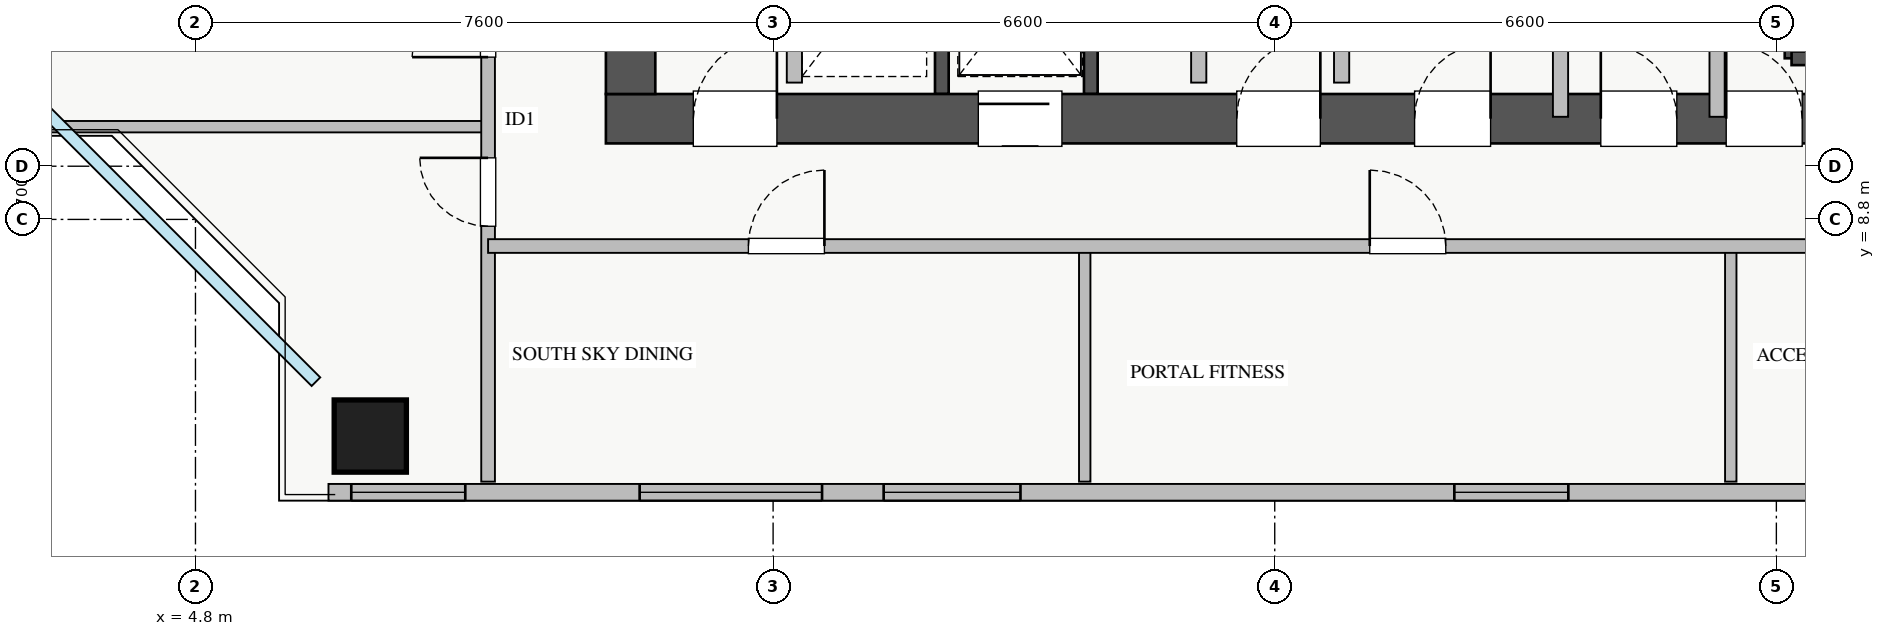
"""IFC4 building model, lengths in metres.
Left out: names, types, materials, properties, quantities, classifications, styles, units other than length and angle.
Written with IfcOpenShell. Run it as: python <this file> out.ifc"""

import sys

from ifc_helpers import new_model, si_unit, direction, frame, frame_2d, origin, origin_2d, place, context, subcontext, project, spatial, rectangle, extrude, source, transform, mapped, element, fill, save


model = new_model("IFC4")
c1 = context("Model", 3, precision=1e-05, world=origin(), true_north=direction((0.0, 1.0)))
c2 = subcontext(c1, "Body", "Model", "MODEL_VIEW")
j1 = project(units=[si_unit("LENGTHUNIT", "METRE"), si_unit("PLANEANGLEUNIT", "RADIAN")], contexts=[c1])
p1 = place(None, origin())
s1 = spatial("IfcSite", under=j1, at=p1, CompositionType="ELEMENT")
p2 = place(p1, origin())
s2 = spatial("IfcBuilding", under=s1, at=p2, CompositionType="ELEMENT")
p3 = place(p2, frame((0.0, 0.0, 160.0)))
s3 = spatial("IfcBuildingStorey", under=s2, at=p3, CompositionType="ELEMENT", Elevation=160.0)
p4 = place(p3, frame((14.62, 10.45, 0.0), z_axis=(0.0, 0.0, 1.0), x_axis=(0.0, 1.0, 0.0)))
e1 = element("IfcWall", 1, at=p4, inside=s3, PredefinedType="SHEAR", context=c2, shape_type="SweptSolid", body=[
    extrude(rectangle(XDim=2.35, YDim=0.18, at=frame_2d((1.175, 0.0))), origin(), (0.0, 0.0, 1.0), 3.07),
])
p5 = place(p3, frame((25.8, 10.92, 0.0), z_axis=(0.0, 0.0, 1.0), x_axis=(0.0, 1.0, 0.0)))
e2 = element("IfcWall", 2, at=p5, inside=s3, PredefinedType="SHEAR", context=c2, shape_type="SweptSolid", body=[
    extrude(rectangle(XDim=1.06, YDim=0.18, at=frame_2d((0.53, 0.0))), origin(), (0.0, 0.0, 1.0), 3.07),
])
p6 = place(p3, frame((25.8, 10.92, 0.0), z_axis=(0.0, 0.0, 1.0), x_axis=(1.0, 0.0, 0.0)))
e3 = element("IfcWall", 3, at=p6, inside=s3, PredefinedType="SHEAR", context=c2, shape_type="SweptSolid", body=[
    extrude(rectangle(XDim=1.35, YDim=0.18, at=frame_2d((0.675, 0.0))), origin(), (0.0, 0.0, 1.0), 3.07),
])
p7 = place(p3, frame((16.58, 10.45, 0.0), z_axis=(0.0, 0.0, 1.0), x_axis=(0.0, 1.0, 0.0)))
e4 = element("IfcWall", 4, at=p7, inside=s3, PredefinedType="SHEAR", context=c2, shape_type="SweptSolid", body=[
    extrude(rectangle(XDim=2.35, YDim=0.18, at=frame_2d((1.175, 0.0))), origin(), (0.0, 0.0, 1.0), 3.07),
])
p8 = place(p3, frame((10.2, 10.125, 0.0), z_axis=(0.0, 0.0, 1.0), x_axis=(1.0, 0.0, 0.0)))
e5 = element("IfcWall", 5, at=p8, inside=s3, PredefinedType="SHEAR", context=c2, shape_type="SweptSolid", body=[
    extrude(rectangle(XDim=17.6, YDim=0.65, at=frame_2d((8.8, 0.0))), origin(), (0.0, 0.0, 1.0), 3.25),
])
p9 = place(p8, frame((1.15, 0.0, 0.0)))
e6 = element("IfcOpeningElement", 6, at=p9, cuts=e5, PredefinedType="OPENING", context=c2, shape_type="SweptSolid", body=[
    extrude(rectangle(XDim=1.1, YDim=2.05, at=frame_2d((0.55, 1.025))), frame((0.0, 0.335, 0.0), z_axis=(0.0, -1.0, 0.0), x_axis=(1.0, 0.0, 0.0)), (0.0, 0.0, 1.0), 0.67),
])
p10 = place(p8, frame((8.3, 0.0, 0.0)))
e7 = element("IfcOpeningElement", 7, at=p10, cuts=e5, PredefinedType="OPENING", context=c2, shape_type="SweptSolid", body=[
    extrude(rectangle(XDim=1.1, YDim=2.05, at=frame_2d((0.55, 1.025))), frame((0.0, 0.335, 0.0), z_axis=(0.0, -1.0, 0.0), x_axis=(1.0, 0.0, 0.0)), (0.0, 0.0, 1.0), 0.67),
])
p11 = place(p8, frame((4.9, 0.0, 0.0)))
e8 = element("IfcOpeningElement", 8, at=p11, cuts=e5, PredefinedType="OPENING", context=c2, shape_type="SweptSolid", body=[
    extrude(rectangle(XDim=1.1, YDim=2.05, at=frame_2d((0.55, 1.025))), frame((0.0, 0.335, 0.0), z_axis=(0.0, -1.0, 0.0), x_axis=(1.0, 0.0, 0.0)), (0.0, 0.0, 1.0), 0.67),
])
p12 = place(p8, frame((14.74, 0.0, 0.0)))
e9 = element("IfcOpeningElement", 9, at=p12, cuts=e5, PredefinedType="OPENING", context=c2, shape_type="SweptSolid", body=[
    extrude(rectangle(XDim=1.0, YDim=2.05, at=frame_2d((0.5, 1.025))), frame((0.0, 0.335, 0.0), z_axis=(0.0, -1.0, 0.0), x_axis=(1.0, 0.0, 0.0)), (0.0, 0.0, 1.0), 0.67),
])
p13 = place(p8, frame((10.64, 0.0, 0.0)))
e10 = element("IfcOpeningElement", 10, at=p13, cuts=e5, PredefinedType="OPENING", context=c2, shape_type="SweptSolid", body=[
    extrude(rectangle(XDim=1.0, YDim=2.05, at=frame_2d((0.5, 1.025))), frame((0.0, 0.335, 0.0), z_axis=(0.0, -1.0, 0.0), x_axis=(1.0, 0.0, 0.0)), (0.0, 0.0, 1.0), 0.67),
])
p14 = place(p8, frame((13.09, 0.0, 0.0)))
e11 = element("IfcOpeningElement", 11, at=p14, cuts=e5, PredefinedType="OPENING", context=c2, shape_type="SweptSolid", body=[
    extrude(rectangle(XDim=1.0, YDim=2.05, at=frame_2d((0.5, 1.025))), frame((0.0, 0.335, 0.0), z_axis=(0.0, -1.0, 0.0), x_axis=(1.0, 0.0, 0.0)), (0.0, 0.0, 1.0), 0.67),
])
p15 = place(p3, frame((10.525, 10.45, 0.0), z_axis=(0.0, 0.0, 1.0), x_axis=(0.0, 1.0, 0.0)))
e12 = element("IfcWall", 12, at=p15, inside=s3, PredefinedType="SHEAR", context=c2, shape_type="SweptSolid", body=[
    extrude(rectangle(XDim=5.9, YDim=0.65, at=frame_2d((2.95, 0.0))), origin(), (0.0, 0.0, 1.0), 3.25),
])
m1 = source(origin(), c2, "Body", "SweptSolid", [
    extrude(rectangle(XDim=0.95, YDim=0.95, at=origin_2d()), origin(), (0.0, 0.0, 1.0), 3.25),
])
p16 = place(p3, frame((7.1, 5.95, 0.0), z_axis=(0.0, 0.0, 1.0), x_axis=(1.0, 0.0, 0.0)))
e13 = element("IfcColumn", 13, at=p16, inside=s3, PredefinedType="COLUMN", context=c2, shape_type="MappedRepresentation", body=[
    mapped(m1, transform((0.0, 0.0, 0.0), x_axis=(1.0, 0.0, 0.0), y_axis=(0.0, 1.0, 0.0), z_axis=(0.0, 0.0, 1.0), scale=1.0)),
])
p17 = place(p3, frame((6.55, 5.21, 0.0), z_axis=(0.0, 0.0, 1.0), x_axis=(1.0, 0.0, 0.0)))
e14 = element("IfcWall", 14, at=p17, inside=s3, PredefinedType="STANDARD", context=c2, shape_type="SweptSolid", body=[
    extrude(rectangle(XDim=24.9, YDim=0.22, at=frame_2d((12.45, 0.0))), origin(), (0.0, 0.0, 1.0), 2.61),
])
p18 = place(p17, frame((0.3, 0.0, 0.9)))
e15 = element("IfcOpeningElement", 15, at=p18, cuts=e14, PredefinedType="OPENING", context=c2, shape_type="SweptSolid", body=[
    extrude(rectangle(XDim=1.5, YDim=1.5, at=frame_2d((0.75, 0.75))), frame((0.0, 0.12, 0.0), z_axis=(0.0, -1.0, 0.0), x_axis=(1.0, 0.0, 0.0)), (0.0, 0.0, 1.0), 0.24),
])
p19 = place(p17, frame((7.304, 0.0, 0.9)))
e16 = element("IfcOpeningElement", 16, at=p19, cuts=e14, PredefinedType="OPENING", context=c2, shape_type="SweptSolid", body=[
    extrude(rectangle(XDim=1.8, YDim=1.5, at=frame_2d((0.9, 0.75))), frame((0.0, 0.12, 0.0), z_axis=(0.0, -1.0, 0.0), x_axis=(1.0, 0.0, 0.0)), (0.0, 0.0, 1.0), 0.24),
])
p20 = place(p17, frame((14.813, 0.0, 0.9)))
e17 = element("IfcOpeningElement", 17, at=p20, cuts=e14, PredefinedType="OPENING", context=c2, shape_type="SweptSolid", body=[
    extrude(rectangle(XDim=1.5, YDim=1.45, at=frame_2d((0.75, 0.725))), frame((0.0, 0.12, 0.0), z_axis=(0.0, -1.0, 0.0), x_axis=(1.0, 0.0, 0.0)), (0.0, 0.0, 1.0), 0.24),
])
p21 = place(p17, frame((20.738, 0.0, 0.9)))
e18 = element("IfcOpeningElement", 18, at=p21, cuts=e14, PredefinedType="OPENING", context=c2, shape_type="SweptSolid", body=[
    extrude(rectangle(XDim=2.1, YDim=1.48, at=frame_2d((1.05, 0.74))), frame((0.0, 0.12, 0.0), z_axis=(0.0, -1.0, 0.0), x_axis=(1.0, 0.0, 0.0)), (0.0, 0.0, 1.0), 0.24),
])
p22 = place(p17, frame((4.094, 0.0, 0.9)))
e19 = element("IfcOpeningElement", 19, at=p22, cuts=e14, PredefinedType="OPENING", context=c2, shape_type="SweptSolid", body=[
    extrude(rectangle(XDim=2.4, YDim=1.5, at=frame_2d((1.2, 0.75))), frame((0.0, 0.12, 0.0), z_axis=(0.0, -1.0, 0.0), x_axis=(1.0, 0.0, 0.0)), (0.0, 0.0, 1.0), 0.24),
])
for number, where, z_axis, x_axis in (
    (20, (12.68, 10.6, 0.0), (0.0, 0.0, 1.0), (0.0, 1.0, 0.0)),
    (21, (18.0, 10.6, 0.0), (0.0, 0.0, 1.0), (0.0, 1.0, 0.0)),
    (22, (19.88, 10.6, 0.0), (0.0, 0.0, 1.0), (0.0, 1.0, 0.0)),
):
    element("IfcWall", number, at=place(p3, frame(where, z_axis=z_axis, x_axis=x_axis)), inside=s3, PredefinedType="PARTITIONING", context=c2, shape_type="SweptSolid", body=[
        extrude(rectangle(XDim=2.21, YDim=0.2, at=frame_2d((1.105, 0.0))), origin(), (0.0, 0.0, 1.0), 3.07),
    ])
for number, where, z_axis, x_axis in (
    (23, (24.82, 10.15, 0.0), (0.0, 0.0, 1.0), (0.0, 1.0, 0.0)),
    (24, (22.76, 10.15, 0.0), (0.0, 0.0, 1.0), (0.0, 1.0, 0.0)),
):
    element("IfcWall", number, at=place(p3, frame(where, z_axis=z_axis, x_axis=x_axis)), inside=s3, PredefinedType="PARTITIONING", context=c2, shape_type="SweptSolid", body=[
        extrude(rectangle(XDim=2.65, YDim=0.2, at=frame_2d((1.325, 0.0))), origin(), (0.0, 0.0, 1.0), 3.07),
    ])
p23 = place(p3, frame((1.35, 10.02, 0.0), z_axis=(0.0, 0.0, 1.0), x_axis=(1.0, 0.0, 0.0)))
e25 = element("IfcWall", 25, at=p23, inside=s3, PredefinedType="PARTITIONING", context=c2, shape_type="SweptSolid", body=[
    extrude(rectangle(XDim=7.3, YDim=0.15, at=frame_2d((3.65, 0.0))), origin(), (0.0, 0.0, 1.0), 3.07),
])
p24 = place(p3, frame((8.65, 5.35, 0.0), z_axis=(0.0, 0.0, 1.0), x_axis=(0.0, 1.0, 0.0)))
e26 = element("IfcWall", 26, at=p24, inside=s3, PredefinedType="PARTITIONING", context=c2, shape_type="SweptSolid", body=[
    extrude(rectangle(XDim=11.35, YDim=0.18, at=frame_2d((5.675, 0.0))), origin(), (0.0, 0.0, 1.0), 3.07),
])
p25 = place(p24, frame((3.36, 0.0, 0.0)))
e27 = element("IfcOpeningElement", 27, at=p25, cuts=e26, PredefinedType="OPENING", context=c2, shape_type="SweptSolid", body=[
    extrude(rectangle(XDim=0.9, YDim=2.05, at=frame_2d((0.45, 1.025))), frame((0.0, 0.1, 0.0), z_axis=(0.0, -1.0, 0.0), x_axis=(1.0, 0.0, 0.0)), (0.0, 0.0, 1.0), 0.2),
])
p26 = place(p24, frame((5.585, 0.0, 0.0)))
e28 = element("IfcOpeningElement", 28, at=p26, cuts=e26, PredefinedType="OPENING", context=c2, shape_type="SweptSolid", body=[
    extrude(rectangle(XDim=1.0, YDim=2.05, at=frame_2d((0.5, 1.025))), frame((0.0, 0.1, 0.0), z_axis=(0.0, -1.0, 0.0), x_axis=(1.0, 0.0, 0.0)), (0.0, 0.0, 1.0), 0.2),
])
for number, where, z_axis, x_axis in (
    (29, (16.5, 5.35, 0.0), (0.0, 0.0, 1.0), (0.0, 1.0, 0.0)),
    (30, (25.0, 5.35, 0.0), (0.0, 0.0, 1.0), (0.0, 1.0, 0.0)),
):
    element("IfcWall", number, at=place(p3, frame(where, z_axis=z_axis, x_axis=x_axis)), inside=s3, PredefinedType="PARTITIONING", context=c2, shape_type="SweptSolid", body=[
        extrude(rectangle(XDim=3.1, YDim=0.15, at=frame_2d((1.55, 0.0))), origin(), (0.0, 0.0, 1.0), 3.07),
    ])
p27 = place(p3, frame((8.65, 8.45, 0.0), z_axis=(0.0, 0.0, 1.0), x_axis=(1.0, 0.0, 0.0)))
e31 = element("IfcWall", 31, at=p27, inside=s3, PredefinedType="PARTITIONING", context=c2, shape_type="SweptSolid", body=[
    extrude(rectangle(XDim=23.8, YDim=0.18, at=frame_2d((11.9, 0.0))), origin(), (0.0, 0.0, 1.0), 3.07),
])
p28 = place(p27, frame((3.425, 0.0, 0.0)))
e32 = element("IfcOpeningElement", 32, at=p28, cuts=e31, PredefinedType="OPENING", context=c2, shape_type="SweptSolid", body=[
    extrude(rectangle(XDim=1.0, YDim=2.05, at=frame_2d((0.5, 1.025))), frame((0.0, 0.1, 0.0), z_axis=(0.0, -1.0, 0.0), x_axis=(1.0, 0.0, 0.0)), (0.0, 0.0, 1.0), 0.2),
])
p29 = place(p27, frame((11.6, 0.0, 0.0)))
e33 = element("IfcOpeningElement", 33, at=p29, cuts=e31, PredefinedType="OPENING", context=c2, shape_type="SweptSolid", body=[
    extrude(rectangle(XDim=1.0, YDim=2.05, at=frame_2d((0.5, 1.025))), frame((0.0, 0.1, 0.0), z_axis=(0.0, -1.0, 0.0), x_axis=(1.0, 0.0, 0.0)), (0.0, 0.0, 1.0), 0.2),
])
p30 = place(p27, frame((19.575, 0.0, 0.0)))
e34 = element("IfcOpeningElement", 34, at=p30, cuts=e31, PredefinedType="OPENING", context=c2, shape_type="SweptSolid", body=[
    extrude(rectangle(XDim=1.0, YDim=2.05, at=frame_2d((0.5, 1.025))), frame((0.0, 0.1, 0.0), z_axis=(0.0, -1.0, 0.0), x_axis=(1.0, 0.0, 0.0)), (0.0, 0.0, 1.0), 0.2),
])
m2 = source(origin(), c2, "Body", "SweptSolid", [
    extrude(rectangle(XDim=1.5, YDim=1.5, at=frame_2d((0.75, 0.75))), frame((0.0, 0.03, 0.0), z_axis=(0.0, -1.0, 0.0), x_axis=(1.0, 0.0, 0.0)), (0.0, 0.0, 1.0), 0.06),
])
p31 = place(p18, origin())
e35 = element("IfcWindow", 35, at=p31, inside=s3, PartitioningType="TRIPLE_PANEL_VERTICAL", PredefinedType="WINDOW", context=c2, shape_type="MappedRepresentation", body=[
    mapped(m2, transform((0.0, 0.0, 0.0), x_axis=(1.0, 0.0, 0.0), y_axis=(0.0, 1.0, 0.0), z_axis=(0.0, 0.0, 1.0), scale=1.0)),
])
fill(e15, e35)
m3 = source(origin(), c2, "Body", "SweptSolid", [
    extrude(rectangle(XDim=1.8, YDim=1.5, at=frame_2d((0.9, 0.75))), frame((0.0, 0.03, 0.0), z_axis=(0.0, -1.0, 0.0), x_axis=(1.0, 0.0, 0.0)), (0.0, 0.0, 1.0), 0.06),
])
p32 = place(p19, origin())
e36 = element("IfcWindow", 36, at=p32, inside=s3, PartitioningType="DOUBLE_PANEL_VERTICAL", PredefinedType="WINDOW", context=c2, shape_type="MappedRepresentation", body=[
    mapped(m3, transform((0.0, 0.0, 0.0), x_axis=(1.0, 0.0, 0.0), y_axis=(0.0, 1.0, 0.0), z_axis=(0.0, 0.0, 1.0), scale=1.0)),
])
fill(e16, e36)
m4 = source(origin(), c2, "Body", "SweptSolid", [
    extrude(rectangle(XDim=1.5, YDim=1.45, at=frame_2d((0.75, 0.725))), frame((0.0, 0.03, 0.0), z_axis=(0.0, -1.0, 0.0), x_axis=(1.0, 0.0, 0.0)), (0.0, 0.0, 1.0), 0.06),
])
p33 = place(p20, origin())
e37 = element("IfcWindow", 37, at=p33, inside=s3, PartitioningType="DOUBLE_PANEL_VERTICAL", PredefinedType="WINDOW", context=c2, shape_type="MappedRepresentation", body=[
    mapped(m4, transform((0.0, 0.0, 0.0), x_axis=(1.0, 0.0, 0.0), y_axis=(0.0, 1.0, 0.0), z_axis=(0.0, 0.0, 1.0), scale=1.0)),
])
fill(e17, e37)
m5 = source(origin(), c2, "Body", "SweptSolid", [
    extrude(rectangle(XDim=1.1, YDim=2.05, at=frame_2d((0.55, 1.025))), frame((0.0, 0.025, 0.0), z_axis=(0.0, -1.0, 0.0), x_axis=(1.0, 0.0, 0.0)), (0.0, 0.0, 1.0), 0.05),
])
p34 = place(p9, origin())
e38 = element("IfcDoor", 38, at=p34, inside=s3, OperationType="SINGLE_SWING_RIGHT", PredefinedType="DOOR", context=c2, shape_type="MappedRepresentation", body=[
    mapped(m5, transform((0.0, 0.0, 0.0), x_axis=(1.0, 0.0, 0.0), y_axis=(0.0, 1.0, 0.0), z_axis=(0.0, 0.0, 1.0), scale=1.0)),
])
fill(e6, e38)
p35 = place(p10, origin())
e39 = element("IfcDoor", 39, at=p35, inside=s3, OperationType="SINGLE_SWING_RIGHT", PredefinedType="DOOR", context=c2, shape_type="MappedRepresentation", body=[
    mapped(m5, transform((0.0, 0.0, 0.0), x_axis=(1.0, 0.0, 0.0), y_axis=(0.0, 1.0, 0.0), z_axis=(0.0, 0.0, 1.0), scale=1.0)),
])
fill(e7, e39)
p36 = place(p11, origin())
e40 = element("IfcDoor", 40, at=p36, inside=s3, OperationType="SLIDING_TO_RIGHT", PredefinedType="DOOR", context=c2, shape_type="MappedRepresentation", body=[
    mapped(m5, transform((0.0, 0.0, 0.0), x_axis=(1.0, 0.0, 0.0), y_axis=(0.0, 1.0, 0.0), z_axis=(0.0, 0.0, 1.0), scale=1.0)),
])
fill(e8, e40)
m6 = source(origin(), c2, "Body", "SweptSolid", [
    extrude(rectangle(XDim=1.0, YDim=2.05, at=frame_2d((0.5, 1.025))), frame((0.0, 0.025, 0.0), z_axis=(0.0, -1.0, 0.0), x_axis=(1.0, 0.0, 0.0)), (0.0, 0.0, 1.0), 0.05),
])
p37 = place(p12, origin())
e41 = element("IfcDoor", 41, at=p37, inside=s3, OperationType="SINGLE_SWING_LEFT", PredefinedType="DOOR", context=c2, shape_type="MappedRepresentation", body=[
    mapped(m6, transform((0.0, 0.0, 0.0), x_axis=(1.0, 0.0, 0.0), y_axis=(0.0, 1.0, 0.0), z_axis=(0.0, 0.0, 1.0), scale=1.0)),
])
fill(e9, e41)
p38 = place(p13, origin())
e42 = element("IfcDoor", 42, at=p38, inside=s3, OperationType="SINGLE_SWING_RIGHT", PredefinedType="DOOR", context=c2, shape_type="MappedRepresentation", body=[
    mapped(m6, transform((0.0, 0.0, 0.0), x_axis=(1.0, 0.0, 0.0), y_axis=(0.0, 1.0, 0.0), z_axis=(0.0, 0.0, 1.0), scale=1.0)),
])
fill(e10, e42)
p39 = place(p14, origin())
e43 = element("IfcDoor", 43, at=p39, inside=s3, OperationType="SINGLE_SWING_LEFT", PredefinedType="DOOR", context=c2, shape_type="MappedRepresentation", body=[
    mapped(m6, transform((0.0, 0.0, 0.0), x_axis=(1.0, 0.0, 0.0), y_axis=(0.0, 1.0, 0.0), z_axis=(0.0, 0.0, 1.0), scale=1.0)),
])
fill(e11, e43)
m7 = source(origin(), c2, "Body", "SweptSolid", [
    extrude(rectangle(XDim=0.9, YDim=2.05, at=frame_2d((0.45, 1.025))), frame((0.0, 0.025, 0.0), z_axis=(0.0, -1.0, 0.0), x_axis=(1.0, 0.0, 0.0)), (0.0, 0.0, 1.0), 0.05),
])
p40 = place(p25, origin())
e44 = element("IfcDoor", 44, at=p40, inside=s3, OperationType="SINGLE_SWING_RIGHT", PredefinedType="DOOR", context=c2, shape_type="MappedRepresentation", body=[
    mapped(m7, transform((0.0, 0.0, 0.0), x_axis=(1.0, 0.0, 0.0), y_axis=(0.0, 1.0, 0.0), z_axis=(0.0, 0.0, 1.0), scale=1.0)),
])
fill(e27, e44)
p41 = place(p26, origin())
e45 = element("IfcDoor", 45, at=p41, inside=s3, OperationType="SINGLE_SWING_LEFT", PredefinedType="DOOR", context=c2, shape_type="MappedRepresentation", body=[
    mapped(m6, transform((0.0, 0.0, 0.0), x_axis=(1.0, 0.0, 0.0), y_axis=(0.0, 1.0, 0.0), z_axis=(0.0, 0.0, 1.0), scale=1.0)),
])
fill(e28, e45)
p42 = place(p28, origin())
e46 = element("IfcDoor", 46, at=p42, inside=s3, OperationType="SINGLE_SWING_RIGHT", PredefinedType="DOOR", context=c2, shape_type="MappedRepresentation", body=[
    mapped(m6, transform((0.0, 0.0, 0.0), x_axis=(1.0, 0.0, 0.0), y_axis=(0.0, 1.0, 0.0), z_axis=(0.0, 0.0, 1.0), scale=1.0)),
])
fill(e32, e46)
p43 = place(p29, origin())
e47 = element("IfcDoor", 47, at=p43, inside=s3, OperationType="SINGLE_SWING_LEFT", PredefinedType="DOOR", context=c2, shape_type="MappedRepresentation", body=[
    mapped(m6, transform((0.0, 0.0, 0.0), x_axis=(1.0, 0.0, 0.0), y_axis=(0.0, 1.0, 0.0), z_axis=(0.0, 0.0, 1.0), scale=1.0)),
])
fill(e33, e47)
m8 = source(origin(), c2, "Body", "SweptSolid", [
    extrude(rectangle(XDim=2.4, YDim=1.5, at=frame_2d((1.2, 0.75))), frame((0.0, 0.03, 0.0), z_axis=(0.0, -1.0, 0.0), x_axis=(1.0, 0.0, 0.0)), (0.0, 0.0, 1.0), 0.06),
])
p44 = place(p22, origin())
e48 = element("IfcWindow", 48, at=p44, inside=s3, PartitioningType="TRIPLE_PANEL_VERTICAL", PredefinedType="WINDOW", context=c2, shape_type="MappedRepresentation", body=[
    mapped(m8, transform((0.0, 0.0, 0.0), x_axis=(1.0, 0.0, 0.0), y_axis=(0.0, 1.0, 0.0), z_axis=(0.0, 0.0, 1.0), scale=1.0)),
])
fill(e19, e48)
save(model, sys.argv[1])
